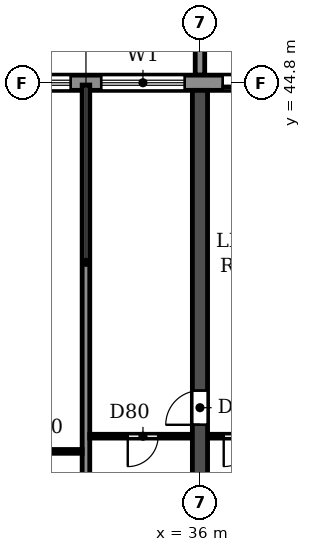
"""IFC4 building model, lengths in metres.
Left out: names, types, materials, properties, quantities, classifications, styles, units other than length and angle.
Written with IfcOpenShell. Run it as: python <this file> out.ifc"""

import sys

from ifc_helpers import new_model, si_unit, direction, frame, frame_2d, origin, place, context, subcontext, project, spatial, polyline, rectangle, outline, extrude, source, transform, mapped, element, fill, save


model = new_model("IFC4")
c1 = context("Model", 3, precision=1e-05, world=origin(), true_north=direction((0.0, 1.0)))
c2 = subcontext(c1, "Body", "Model", "MODEL_VIEW")
j1 = project(units=[si_unit("LENGTHUNIT", "METRE"), si_unit("PLANEANGLEUNIT", "RADIAN")], contexts=[c1])
p1 = place(None, origin())
s1 = spatial("IfcSite", under=j1, at=p1, CompositionType="ELEMENT")
p2 = place(p1, origin())
s2 = spatial("IfcBuilding", under=s1, at=p2, CompositionType="ELEMENT")
p3 = place(p2, frame((0.0, 0.0, 56.4)))
s3 = spatial("IfcBuildingStorey", under=s2, at=p3, CompositionType="ELEMENT", Elevation=56.4)
p4 = place(p3, frame((36.0, 30.55, 0.0), z_axis=(0.0, 0.0, 1.0), x_axis=(0.0, 1.0, 0.0)))
e1 = element("IfcWall", 1, at=p4, inside=s3, PredefinedType="SHEAR", context=c2, shape_type="SweptSolid", body=[
    extrude(rectangle(XDim=14.05, YDim=0.4, at=frame_2d((7.025, 0.0))), origin(), (0.0, 0.0, 1.0), 3.05),
])
p5 = place(p4, frame((5.25, 0.0, 0.0)))
e2 = element("IfcOpeningElement", 2, at=p5, cuts=e1, PredefinedType="OPENING", context=c2, shape_type="SweptSolid", body=[
    extrude(rectangle(XDim=0.9, YDim=2.1, at=frame_2d((0.45, 1.05))), frame((0.0, 0.21, 0.0), z_axis=(0.0, -1.0, 0.0), x_axis=(1.0, 0.0, 0.0)), (0.0, 0.0, 1.0), 0.42),
])
p6 = place(p3, frame((91.317, 44.8, 0.0), z_axis=(0.0, 0.0, 1.0), x_axis=(-1.0, 0.0, 0.0)))
e3 = element("IfcWall", 3, at=p6, inside=s3, PredefinedType="STANDARD", context=c2, shape_type="SweptSolid", body=[
    extrude(rectangle(XDim=80.634, YDim=0.4, at=frame_2d((40.317, 0.0))), origin(), (0.0, 0.0, 1.0), 3.05),
])
p7 = place(p6, frame((76.717, 0.0, 0.9)))
e4 = element("IfcOpeningElement", 4, at=p7, cuts=e3, PredefinedType="OPENING", context=c2, shape_type="SweptSolid", body=[
    extrude(rectangle(XDim=2.2, YDim=1.5, at=frame_2d((1.1, 0.75))), frame((0.0, 0.21, 0.0), z_axis=(0.0, -1.0, 0.0), x_axis=(1.0, 0.0, 0.0)), (0.0, 0.0, 1.0), 0.42),
])
p8 = place(p6, frame((73.917, 0.0, 0.0)))
e5 = element("IfcOpeningElement", 5, at=p8, cuts=e3, PredefinedType="OPENING", context=c2, shape_type="SweptSolid", body=[
    extrude(rectangle(XDim=1.8, YDim=2.4, at=frame_2d((0.9, 1.2))), frame((0.0, 0.21, 0.0), z_axis=(0.0, -1.0, 0.0), x_axis=(1.0, 0.0, 0.0)), (0.0, 0.0, 1.0), 0.42),
])
p9 = place(p6, frame((70.717, 0.0, 0.9)))
e6 = element("IfcOpeningElement", 6, at=p9, cuts=e3, PredefinedType="OPENING", context=c2, shape_type="SweptSolid", body=[
    extrude(rectangle(XDim=2.2, YDim=1.5, at=frame_2d((1.1, 0.75))), frame((0.0, 0.21, 0.0), z_axis=(0.0, -1.0, 0.0), x_axis=(1.0, 0.0, 0.0)), (0.0, 0.0, 1.0), 0.42),
])
p10 = place(p6, frame((67.917, 0.0, 0.0)))
e7 = element("IfcOpeningElement", 7, at=p10, cuts=e3, PredefinedType="OPENING", context=c2, shape_type="SweptSolid", body=[
    extrude(rectangle(XDim=1.8, YDim=2.4, at=frame_2d((0.9, 1.2))), frame((0.0, 0.21, 0.0), z_axis=(0.0, -1.0, 0.0), x_axis=(1.0, 0.0, 0.0)), (0.0, 0.0, 1.0), 0.42),
])
p11 = place(p6, frame((64.717, 0.0, 0.9)))
e8 = element("IfcOpeningElement", 8, at=p11, cuts=e3, PredefinedType="OPENING", context=c2, shape_type="SweptSolid", body=[
    extrude(rectangle(XDim=2.2, YDim=1.5, at=frame_2d((1.1, 0.75))), frame((0.0, 0.21, 0.0), z_axis=(0.0, -1.0, 0.0), x_axis=(1.0, 0.0, 0.0)), (0.0, 0.0, 1.0), 0.42),
])
p12 = place(p6, frame((61.917, 0.0, 0.0)))
e9 = element("IfcOpeningElement", 9, at=p12, cuts=e3, PredefinedType="OPENING", context=c2, shape_type="SweptSolid", body=[
    extrude(rectangle(XDim=1.8, YDim=2.4, at=frame_2d((0.9, 1.2))), frame((0.0, 0.21, 0.0), z_axis=(0.0, -1.0, 0.0), x_axis=(1.0, 0.0, 0.0)), (0.0, 0.0, 1.0), 0.42),
])
p13 = place(p6, frame((58.717, 0.0, 0.9)))
e10 = element("IfcOpeningElement", 10, at=p13, cuts=e3, PredefinedType="OPENING", context=c2, shape_type="SweptSolid", body=[
    extrude(rectangle(XDim=2.2, YDim=1.5, at=frame_2d((1.1, 0.75))), frame((0.0, 0.21, 0.0), z_axis=(0.0, -1.0, 0.0), x_axis=(1.0, 0.0, 0.0)), (0.0, 0.0, 1.0), 0.42),
])
p14 = place(p6, frame((55.717, 0.0, 0.9)))
e11 = element("IfcOpeningElement", 11, at=p14, cuts=e3, PredefinedType="OPENING", context=c2, shape_type="SweptSolid", body=[
    extrude(rectangle(XDim=2.2, YDim=1.5, at=frame_2d((1.1, 0.75))), frame((0.0, 0.21, 0.0), z_axis=(0.0, -1.0, 0.0), x_axis=(1.0, 0.0, 0.0)), (0.0, 0.0, 1.0), 0.42),
])
p15 = place(p6, frame((52.917, 0.0, 0.0)))
e12 = element("IfcOpeningElement", 12, at=p15, cuts=e3, PredefinedType="OPENING", context=c2, shape_type="SweptSolid", body=[
    extrude(rectangle(XDim=1.8, YDim=2.4, at=frame_2d((0.9, 1.2))), frame((0.0, 0.21, 0.0), z_axis=(0.0, -1.0, 0.0), x_axis=(1.0, 0.0, 0.0)), (0.0, 0.0, 1.0), 0.42),
])
p16 = place(p6, frame((49.717, 0.0, 0.9)))
e13 = element("IfcOpeningElement", 13, at=p16, cuts=e3, PredefinedType="OPENING", context=c2, shape_type="SweptSolid", body=[
    extrude(rectangle(XDim=2.2, YDim=1.5, at=frame_2d((1.1, 0.75))), frame((0.0, 0.21, 0.0), z_axis=(0.0, -1.0, 0.0), x_axis=(1.0, 0.0, 0.0)), (0.0, 0.0, 1.0), 0.42),
])
p17 = place(p6, frame((46.917, 0.0, 0.0)))
e14 = element("IfcOpeningElement", 14, at=p17, cuts=e3, PredefinedType="OPENING", context=c2, shape_type="SweptSolid", body=[
    extrude(rectangle(XDim=1.8, YDim=2.4, at=frame_2d((0.9, 1.2))), frame((0.0, 0.21, 0.0), z_axis=(0.0, -1.0, 0.0), x_axis=(1.0, 0.0, 0.0)), (0.0, 0.0, 1.0), 0.42),
])
p18 = place(p6, frame((43.717, 0.0, 0.9)))
e15 = element("IfcOpeningElement", 15, at=p18, cuts=e3, PredefinedType="OPENING", context=c2, shape_type="SweptSolid", body=[
    extrude(rectangle(XDim=2.2, YDim=1.5, at=frame_2d((1.1, 0.75))), frame((0.0, 0.21, 0.0), z_axis=(0.0, -1.0, 0.0), x_axis=(1.0, 0.0, 0.0)), (0.0, 0.0, 1.0), 0.42),
])
p19 = place(p6, frame((40.717, 0.0, 0.9)))
e16 = element("IfcOpeningElement", 16, at=p19, cuts=e3, PredefinedType="OPENING", context=c2, shape_type="SweptSolid", body=[
    extrude(rectangle(XDim=2.2, YDim=1.5, at=frame_2d((1.1, 0.75))), frame((0.0, 0.21, 0.0), z_axis=(0.0, -1.0, 0.0), x_axis=(1.0, 0.0, 0.0)), (0.0, 0.0, 1.0), 0.42),
])
p20 = place(p6, frame((37.717, 0.0, 0.9)))
e17 = element("IfcOpeningElement", 17, at=p20, cuts=e3, PredefinedType="OPENING", context=c2, shape_type="SweptSolid", body=[
    extrude(rectangle(XDim=2.2, YDim=1.5, at=frame_2d((1.1, 0.75))), frame((0.0, 0.21, 0.0), z_axis=(0.0, -1.0, 0.0), x_axis=(1.0, 0.0, 0.0)), (0.0, 0.0, 1.0), 0.42),
])
p21 = place(p6, frame((34.717, 0.0, 0.9)))
e18 = element("IfcOpeningElement", 18, at=p21, cuts=e3, PredefinedType="OPENING", context=c2, shape_type="SweptSolid", body=[
    extrude(rectangle(XDim=2.2, YDim=1.5, at=frame_2d((1.1, 0.75))), frame((0.0, 0.21, 0.0), z_axis=(0.0, -1.0, 0.0), x_axis=(1.0, 0.0, 0.0)), (0.0, 0.0, 1.0), 0.42),
])
p22 = place(p6, frame((31.917, 0.0, 0.0)))
e19 = element("IfcOpeningElement", 19, at=p22, cuts=e3, PredefinedType="OPENING", context=c2, shape_type="SweptSolid", body=[
    extrude(rectangle(XDim=1.8, YDim=2.4, at=frame_2d((0.9, 1.2))), frame((0.0, 0.21, 0.0), z_axis=(0.0, -1.0, 0.0), x_axis=(1.0, 0.0, 0.0)), (0.0, 0.0, 1.0), 0.42),
])
p23 = place(p6, frame((28.917, 0.0, 0.0)))
e20 = element("IfcOpeningElement", 20, at=p23, cuts=e3, PredefinedType="OPENING", context=c2, shape_type="SweptSolid", body=[
    extrude(rectangle(XDim=1.8, YDim=2.4, at=frame_2d((0.9, 1.2))), frame((0.0, 0.21, 0.0), z_axis=(0.0, -1.0, 0.0), x_axis=(1.0, 0.0, 0.0)), (0.0, 0.0, 1.0), 0.42),
])
p24 = place(p6, frame((25.717, 0.0, 0.9)))
e21 = element("IfcOpeningElement", 21, at=p24, cuts=e3, PredefinedType="OPENING", context=c2, shape_type="SweptSolid", body=[
    extrude(rectangle(XDim=2.2, YDim=1.5, at=frame_2d((1.1, 0.75))), frame((0.0, 0.21, 0.0), z_axis=(0.0, -1.0, 0.0), x_axis=(1.0, 0.0, 0.0)), (0.0, 0.0, 1.0), 0.42),
])
p25 = place(p6, frame((22.917, 0.0, 0.0)))
e22 = element("IfcOpeningElement", 22, at=p25, cuts=e3, PredefinedType="OPENING", context=c2, shape_type="SweptSolid", body=[
    extrude(rectangle(XDim=1.8, YDim=2.4, at=frame_2d((0.9, 1.2))), frame((0.0, 0.21, 0.0), z_axis=(0.0, -1.0, 0.0), x_axis=(1.0, 0.0, 0.0)), (0.0, 0.0, 1.0), 0.42),
])
p26 = place(p6, frame((19.717, 0.0, 0.9)))
e23 = element("IfcOpeningElement", 23, at=p26, cuts=e3, PredefinedType="OPENING", context=c2, shape_type="SweptSolid", body=[
    extrude(rectangle(XDim=2.2, YDim=1.5, at=frame_2d((1.1, 0.75))), frame((0.0, 0.21, 0.0), z_axis=(0.0, -1.0, 0.0), x_axis=(1.0, 0.0, 0.0)), (0.0, 0.0, 1.0), 0.42),
])
p27 = place(p6, frame((16.917, 0.0, 0.0)))
e24 = element("IfcOpeningElement", 24, at=p27, cuts=e3, PredefinedType="OPENING", context=c2, shape_type="SweptSolid", body=[
    extrude(rectangle(XDim=1.8, YDim=2.4, at=frame_2d((0.9, 1.2))), frame((0.0, 0.21, 0.0), z_axis=(0.0, -1.0, 0.0), x_axis=(1.0, 0.0, 0.0)), (0.0, 0.0, 1.0), 0.42),
])
p28 = place(p6, frame((13.717, 0.0, 0.9)))
e25 = element("IfcOpeningElement", 25, at=p28, cuts=e3, PredefinedType="OPENING", context=c2, shape_type="SweptSolid", body=[
    extrude(rectangle(XDim=2.2, YDim=1.5, at=frame_2d((1.1, 0.75))), frame((0.0, 0.21, 0.0), z_axis=(0.0, -1.0, 0.0), x_axis=(1.0, 0.0, 0.0)), (0.0, 0.0, 1.0), 0.42),
])
p29 = place(p6, frame((10.917, 0.0, 0.0)))
e26 = element("IfcOpeningElement", 26, at=p29, cuts=e3, PredefinedType="OPENING", context=c2, shape_type="SweptSolid", body=[
    extrude(rectangle(XDim=1.8, YDim=2.4, at=frame_2d((0.9, 1.2))), frame((0.0, 0.21, 0.0), z_axis=(0.0, -1.0, 0.0), x_axis=(1.0, 0.0, 0.0)), (0.0, 0.0, 1.0), 0.42),
])
p30 = place(p6, frame((7.717, 0.0, 0.9)))
e27 = element("IfcOpeningElement", 27, at=p30, cuts=e3, PredefinedType="OPENING", context=c2, shape_type="SweptSolid", body=[
    extrude(rectangle(XDim=2.2, YDim=1.5, at=frame_2d((1.1, 0.75))), frame((0.0, 0.21, 0.0), z_axis=(0.0, -1.0, 0.0), x_axis=(1.0, 0.0, 0.0)), (0.0, 0.0, 1.0), 0.42),
])
p31 = place(p6, frame((4.717, 0.0, 0.9)))
e28 = element("IfcOpeningElement", 28, at=p31, cuts=e3, PredefinedType="OPENING", context=c2, shape_type="SweptSolid", body=[
    extrude(rectangle(XDim=2.2, YDim=1.5, at=frame_2d((1.1, 0.75))), frame((0.0, 0.21, 0.0), z_axis=(0.0, -1.0, 0.0), x_axis=(1.0, 0.0, 0.0)), (0.0, 0.0, 1.0), 0.42),
])
p32 = place(p6, frame((1.717, 0.0, 0.9)))
e29 = element("IfcOpeningElement", 29, at=p32, cuts=e3, PredefinedType="OPENING", context=c2, shape_type="SweptSolid", body=[
    extrude(rectangle(XDim=2.2, YDim=1.5, at=frame_2d((1.1, 0.75))), frame((0.0, 0.21, 0.0), z_axis=(0.0, -1.0, 0.0), x_axis=(1.0, 0.0, 0.0)), (0.0, 0.0, 1.0), 0.42),
])
m1 = source(origin(), c2, "Body", "SweptSolid", [
    extrude(outline(polyline([(0.0, 0.0), (0.25, 0.0), (0.25, 3.1), (0.0, 3.1), (0.0, 0.0)])), origin(), (0.0, 0.0, 1.0), 3.1),
])
p33 = place(p3, frame((35.875, 45.0, 0.0)))
e30 = element("IfcWall", 30, at=p33, inside=s3, PredefinedType="STANDARD", context=c2, shape_type="MappedRepresentation", body=[
    mapped(m1, transform((0.0, 0.0, 0.0))),
])
p34 = place(p3, frame((33.0, 30.56, 0.0), z_axis=(0.0, 0.0, 1.0), x_axis=(0.0, 1.0, 0.0)))
e31 = element("IfcWall", 31, at=p34, inside=s3, PredefinedType="PARTITIONING", context=c2, shape_type="SweptSolid", body=[
    extrude(rectangle(XDim=14.18, YDim=0.2, at=frame_2d((7.09, 0.0))), origin(), (0.0, 0.0, 1.0), 3.05),
])
p35 = place(p3, frame((30.21, 35.1, 0.0), z_axis=(0.0, 0.0, 1.0), x_axis=(1.0, 0.0, 0.0)))
e32 = element("IfcWall", 32, at=p35, inside=s3, PredefinedType="PARTITIONING", context=c2, shape_type="SweptSolid", body=[
    extrude(rectangle(XDim=2.69, YDim=0.1, at=frame_2d((1.345, 0.0))), origin(), (0.0, 0.0, 1.0), 3.05),
])
p36 = place(p35, frame((0.89, 0.0, 0.0)))
e33 = element("IfcOpeningElement", 33, at=p36, cuts=e32, PredefinedType="OPENING", context=c2, shape_type="SweptSolid", body=[
    extrude(rectangle(XDim=0.8, YDim=2.1, at=frame_2d((0.4, 1.05))), frame((0.0, 0.06, 0.0), z_axis=(0.0, -1.0, 0.0), x_axis=(1.0, 0.0, 0.0)), (0.0, 0.0, 1.0), 0.12),
])
p37 = place(p3, frame((33.1, 35.5, 0.0), z_axis=(0.0, 0.0, 1.0), x_axis=(1.0, 0.0, 0.0)))
e34 = element("IfcWall", 34, at=p37, inside=s3, PredefinedType="PARTITIONING", context=c2, shape_type="SweptSolid", body=[
    extrude(rectangle(XDim=2.69, YDim=0.1, at=frame_2d((1.345, 0.0))), origin(), (0.0, 0.0, 1.0), 3.05),
])
p38 = place(p37, frame((1.0, 0.0, 0.0)))
e35 = element("IfcOpeningElement", 35, at=p38, cuts=e34, PredefinedType="OPENING", context=c2, shape_type="SweptSolid", body=[
    extrude(rectangle(XDim=0.8, YDim=2.1, at=frame_2d((0.4, 1.05))), frame((0.0, 0.06, 0.0), z_axis=(0.0, -1.0, 0.0), x_axis=(1.0, 0.0, 0.0)), (0.0, 0.0, 1.0), 0.12),
])
p39 = place(p3, frame((36.21, 35.5, 0.0), z_axis=(0.0, 0.0, 1.0), x_axis=(1.0, 0.0, 0.0)))
e36 = element("IfcWall", 36, at=p39, inside=s3, PredefinedType="PARTITIONING", context=c2, shape_type="SweptSolid", body=[
    extrude(rectangle(XDim=1.89, YDim=0.1, at=frame_2d((0.945, 0.0))), origin(), (0.0, 0.0, 1.0), 3.05),
])
p40 = place(p39, frame((0.415, 0.0, 0.0)))
e37 = element("IfcOpeningElement", 37, at=p40, cuts=e36, PredefinedType="OPENING", context=c2, shape_type="SweptSolid", body=[
    extrude(rectangle(XDim=0.8, YDim=2.1, at=frame_2d((0.4, 1.05))), frame((0.0, 0.06, 0.0), z_axis=(0.0, -1.0, 0.0), x_axis=(1.0, 0.0, 0.0)), (0.0, 0.0, 1.0), 0.12),
])
p41 = place(p13, origin())
e38 = element("IfcWindow", 38, at=p41, inside=s3, PartitioningType="DOUBLE_PANEL_HORIZONTAL", PredefinedType="WINDOW", context=c2, shape_type="SweptSolid", body=[
    extrude(rectangle(XDim=2.2, YDim=1.5, at=frame_2d((1.1, 0.75))), frame((0.0, 0.03, 0.0), z_axis=(0.0, -1.0, 0.0), x_axis=(1.0, 0.0, 0.0)), (0.0, 0.0, 1.0), 0.06),
])
fill(e10, e38)
p42 = place(p14, origin())
e39 = element("IfcWindow", 39, at=p42, inside=s3, PartitioningType="DOUBLE_PANEL_HORIZONTAL", PredefinedType="WINDOW", context=c2, shape_type="SweptSolid", body=[
    extrude(rectangle(XDim=2.2, YDim=1.5, at=frame_2d((1.1, 0.75))), frame((0.0, 0.03, 0.0), z_axis=(0.0, -1.0, 0.0), x_axis=(1.0, 0.0, 0.0)), (0.0, 0.0, 1.0), 0.06),
])
fill(e11, e39)
p43 = place(p15, origin())
e40 = element("IfcDoor", 40, at=p43, inside=s3, OperationType="DOUBLE_DOOR_SLIDING", PredefinedType="DOOR", context=c2, shape_type="SweptSolid", body=[
    extrude(rectangle(XDim=1.8, YDim=2.4, at=frame_2d((0.9, 1.2))), frame((0.0, 0.025, 0.0), z_axis=(0.0, -1.0, 0.0), x_axis=(1.0, 0.0, 0.0)), (0.0, 0.0, 1.0), 0.05),
])
fill(e12, e40)
p44 = place(p38, frame((0.8, 0.0, 0.0), z_axis=(0.0, 0.0, 1.0), x_axis=(-1.0, 0.0, 0.0)))
e41 = element("IfcDoor", 41, at=p44, inside=s3, OperationType="SINGLE_SWING_RIGHT", PredefinedType="DOOR", context=c2, shape_type="SweptSolid", body=[
    extrude(rectangle(XDim=0.8, YDim=2.1, at=frame_2d((0.4, 1.05))), frame((0.0, 0.025, 0.0), z_axis=(0.0, -1.0, 0.0), x_axis=(1.0, 0.0, 0.0)), (0.0, 0.0, 1.0), 0.05),
])
fill(e35, e41)
p45 = place(p5, origin())
e42 = element("IfcDoor", 42, at=p45, inside=s3, OperationType="SINGLE_SWING_LEFT", PredefinedType="DOOR", context=c2, shape_type="SweptSolid", body=[
    extrude(rectangle(XDim=0.9, YDim=2.1, at=frame_2d((0.45, 1.05))), frame((0.0, 0.025, 0.0), z_axis=(0.0, -1.0, 0.0), x_axis=(1.0, 0.0, 0.0)), (0.0, 0.0, 1.0), 0.05),
])
fill(e2, e42)
p46 = place(p40, frame((0.8, 0.0, 0.0), z_axis=(0.0, 0.0, 1.0), x_axis=(-1.0, 0.0, 0.0)))
e43 = element("IfcDoor", 43, at=p46, inside=s3, OperationType="SINGLE_SWING_RIGHT", PredefinedType="DOOR", context=c2, shape_type="SweptSolid", body=[
    extrude(rectangle(XDim=0.8, YDim=2.1, at=frame_2d((0.4, 1.05))), frame((0.0, 0.025, 0.0), z_axis=(0.0, -1.0, 0.0), x_axis=(1.0, 0.0, 0.0)), (0.0, 0.0, 1.0), 0.05),
])
fill(e37, e43)
save(model, sys.argv[1])
